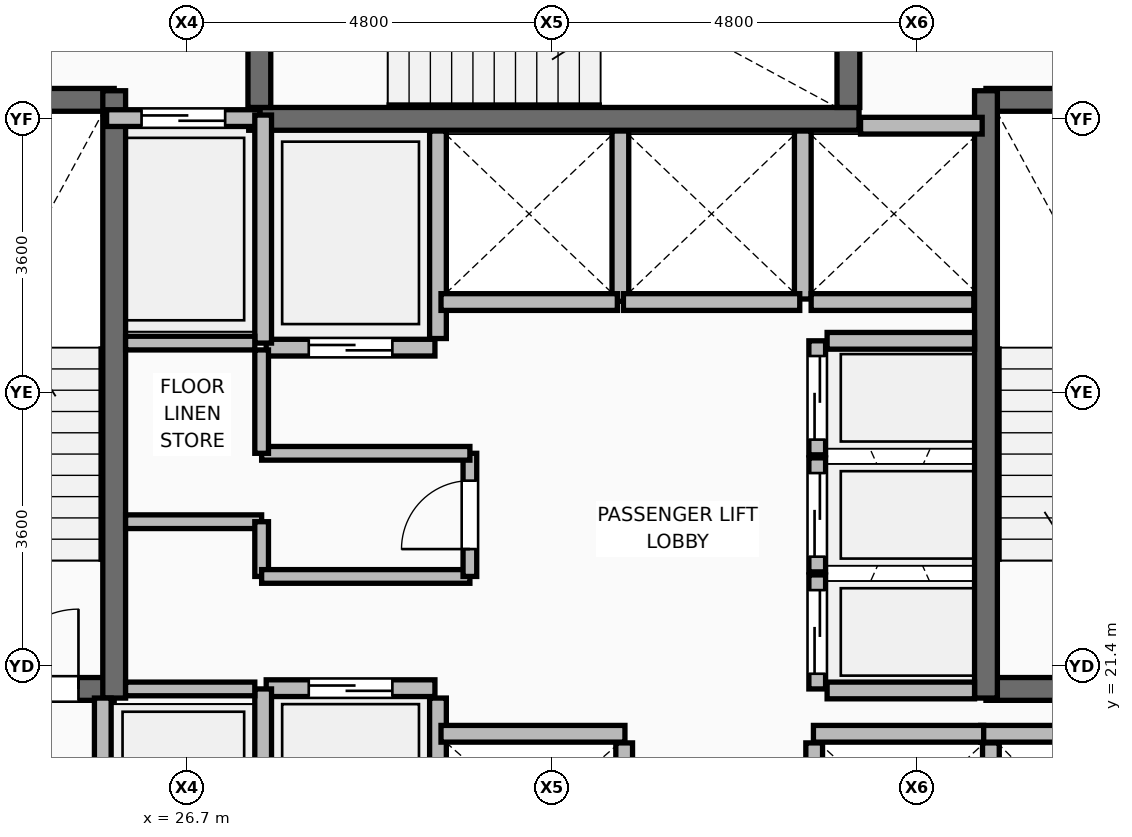
"""IFC4 building model, lengths in metres.
Left out: names, types, materials, properties, quantities, classifications, styles, units other than length and angle.
Written with IfcOpenShell. Run it as: python <this file> out.ifc"""

import sys

from ifc_helpers import new_model, si_unit, direction, frame, frame_2d, origin, place, context, subcontext, project, spatial, rectangle, extrude, element, fill, save


model = new_model("IFC4")
c1 = context("Model", 3, precision=1e-05, world=origin(), true_north=direction((0.0, 1.0)))
c2 = subcontext(c1, "Body", "Model", "MODEL_VIEW")
j1 = project(units=[si_unit("LENGTHUNIT", "METRE"), si_unit("PLANEANGLEUNIT", "RADIAN")], contexts=[c1])
p1 = place(None, origin())
s1 = spatial("IfcSite", under=j1, at=p1, CompositionType="ELEMENT")
p2 = place(p1, origin())
s2 = spatial("IfcBuilding", under=s1, at=p2, CompositionType="ELEMENT")
p3 = place(p2, frame((0.0, 0.0, 149.7)))
s3 = spatial("IfcBuildingStorey", under=s2, at=p3, CompositionType="ELEMENT", Elevation=149.7)
p4 = place(p3, frame((30.0, 18.08, 0.0), z_axis=(0.0, 0.0, 1.0), x_axis=(0.0, 1.0, 0.0)))
e1 = element("IfcWall", 1, at=p4, inside=s3, PredefinedType="PARTITIONING", context=c2, shape_type="SweptSolid", body=[
    extrude(rectangle(XDim=2.9, YDim=0.22, at=frame_2d((1.45, 0.0))), origin(), (0.0, 0.0, 1.0), 3.545),
])
for number, where, z_axis, x_axis in (
    (2, (32.45, 17.92, 0.0), (0.0, 0.0, 1.0), (0.0, 1.0, 0.0)),
    (3, (34.95, 17.92, 0.0), (0.0, 0.0, 1.0), (0.0, 1.0, 0.0)),
):
    element("IfcWall", number, at=place(p3, frame(where, z_axis=z_axis, x_axis=x_axis)), inside=s3, PredefinedType="PARTITIONING", context=c2, shape_type="SweptSolid", body=[
        extrude(rectangle(XDim=2.47, YDim=0.22, at=frame_2d((1.235, 0.0))), origin(), (0.0, 0.0, 1.0), 3.006),
    ])
p5 = place(p3, frame((37.275, 18.08, 0.0), z_axis=(0.0, 0.0, 1.0), x_axis=(0.0, 1.0, 0.0)))
e4 = element("IfcWall", 4, at=p5, inside=s3, PredefinedType="PARTITIONING", context=c2, shape_type="SweptSolid", body=[
    extrude(rectangle(XDim=2.31, YDim=0.22, at=frame_2d((1.155, 0.0))), origin(), (0.0, 0.0, 1.0), 3.545),
])
p6 = place(p3, frame((30.0, 25.71, 0.0), z_axis=(0.0, 0.0, 1.0), x_axis=(0.0, 1.0, 0.0)))
e5 = element("IfcWall", 5, at=p6, inside=s3, PredefinedType="PARTITIONING", context=c2, shape_type="SweptSolid", body=[
    extrude(rectangle(XDim=2.73, YDim=0.22, at=frame_2d((1.365, 0.0))), origin(), (0.0, 0.0, 1.0), 3.545),
])
p7 = place(p3, frame((32.4, 26.2, 0.0), z_axis=(0.0, 0.0, 1.0), x_axis=(0.0, 1.0, 0.0)))
e6 = element("IfcWall", 6, at=p7, inside=s3, PredefinedType="PARTITIONING", context=c2, shape_type="SweptSolid", body=[
    extrude(rectangle(XDim=2.24, YDim=0.22, at=frame_2d((1.12, 0.0))), origin(), (0.0, 0.0, 1.0), 3.545),
])
p8 = place(p3, frame((34.8, 26.23, 0.0), z_axis=(0.0, 0.0, 1.0), x_axis=(0.0, 1.0, 0.0)))
e7 = element("IfcWall", 7, at=p8, inside=s3, PredefinedType="PARTITIONING", context=c2, shape_type="SweptSolid", body=[
    extrude(rectangle(XDim=2.21, YDim=0.22, at=frame_2d((1.105, 0.0))), origin(), (0.0, 0.0, 1.0), 3.545),
])
p9 = place(p3, frame((34.91, 26.19, 0.0), z_axis=(0.0, 0.0, 1.0), x_axis=(1.0, 0.0, 0.0)))
e8 = element("IfcWall", 8, at=p9, inside=s3, PredefinedType="PARTITIONING", context=c2, shape_type="SweptSolid", body=[
    extrude(rectangle(XDim=2.14, YDim=0.22, at=frame_2d((1.07, 0.0))), origin(), (0.0, 0.0, 1.0), 3.545),
])
p10 = place(p3, frame((22.175, 21.1, 0.0), z_axis=(0.0, 0.0, 1.0), x_axis=(1.0, 0.0, 0.0)))
e9 = element("IfcWall", 9, at=p10, inside=s3, PredefinedType="SHEAR", context=c2, shape_type="SweptSolid", body=[
    extrude(rectangle(XDim=3.565, YDim=0.3, at=frame_2d((1.782, 0.0))), origin(), (0.0, 0.0, 1.0), 3.57),
])
p11 = place(p10, frame((2.045, 0.0, 0.0)))
e10 = element("IfcOpeningElement", 10, at=p11, cuts=e9, PredefinedType="OPENING", context=c2, shape_type="SweptSolid", body=[
    extrude(rectangle(XDim=1.05, YDim=2.1, at=frame_2d((0.525, 1.05))), frame((0.0, 0.16, 0.0), z_axis=(0.0, -1.0, 0.0), x_axis=(1.0, 0.0, 0.0)), (0.0, 0.0, 1.0), 0.32),
])
p12 = place(p3, frame((22.175, 28.85, 0.0), z_axis=(0.0, 0.0, 1.0), x_axis=(1.0, 0.0, 0.0)))
e11 = element("IfcWall", 11, at=p12, inside=s3, PredefinedType="SHEAR", context=c2, shape_type="SweptSolid", body=[
    extrude(rectangle(XDim=3.565, YDim=0.3, at=frame_2d((1.782, 0.0))), origin(), (0.0, 0.0, 1.0), 3.57),
])
p13 = place(p3, frame((25.74, 20.98, 0.0), z_axis=(0.0, 0.0, 1.0), x_axis=(0.0, 1.0, 0.0)))
e12 = element("IfcWall", 12, at=p13, inside=s3, PredefinedType="SHEAR", context=c2, shape_type="SweptSolid", body=[
    extrude(rectangle(XDim=7.99, YDim=0.3, at=frame_2d((3.995, 0.0))), origin(), (0.0, 0.0, 1.0), 3.57),
])
for number, where, z_axis, x_axis in (
    (13, (37.21, 21.1, 0.0), (0.0, 0.0, 1.0), (1.0, 0.0, 0.0)),
    (14, (37.21, 28.85, 0.0), (0.0, 0.0, 1.0), (1.0, 0.0, 0.0)),
):
    element("IfcWall", number, at=place(p3, frame(where, z_axis=z_axis, x_axis=x_axis)), inside=s3, PredefinedType="SHEAR", context=c2, shape_type="SweptSolid", body=[
        extrude(rectangle(XDim=3.615, YDim=0.3, at=frame_2d((1.808, 0.0))), origin(), (0.0, 0.0, 1.0), 3.57),
    ])
p14 = place(p3, frame((37.21, 20.98, 0.0), z_axis=(0.0, 0.0, 1.0), x_axis=(0.0, 1.0, 0.0)))
e15 = element("IfcWall", 15, at=p14, inside=s3, PredefinedType="SHEAR", context=c2, shape_type="SweptSolid", body=[
    extrude(rectangle(XDim=7.99, YDim=0.3, at=frame_2d((3.995, 0.0))), origin(), (0.0, 0.0, 1.0), 3.57),
])
p15 = place(p3, frame((27.51, 28.6, 0.0), z_axis=(0.0, 0.0, 1.0), x_axis=(1.0, 0.0, 0.0)))
e16 = element("IfcWall", 16, at=p15, inside=s3, PredefinedType="SHEAR", context=c2, shape_type="SweptSolid", body=[
    extrude(rectangle(XDim=8.03, YDim=0.3, at=frame_2d((4.015, 0.0))), origin(), (0.0, 0.0, 1.0), 3.57),
])
p16 = place(p3, frame((27.65, 28.75, 0.0), z_axis=(0.0, 0.0, 1.0), x_axis=(0.0, 1.0, 0.0)))
e17 = element("IfcWall", 17, at=p16, inside=s3, PredefinedType="SHEAR", context=c2, shape_type="SweptSolid", body=[
    extrude(rectangle(XDim=3.425, YDim=0.3, at=frame_2d((1.712, 0.0))), origin(), (0.0, 0.0, 1.0), 3.57),
])
p17 = place(p16, frame((1.0, 0.0, 0.0)))
e18 = element("IfcOpeningElement", 18, at=p17, cuts=e17, PredefinedType="OPENING", context=c2, shape_type="SweptSolid", body=[
    extrude(rectangle(XDim=1.05, YDim=2.1, at=frame_2d((0.525, 1.05))), frame((0.0, 0.16, 0.0), z_axis=(0.0, -1.0, 0.0), x_axis=(1.0, 0.0, 0.0)), (0.0, 0.0, 1.0), 0.32),
])
p18 = place(p3, frame((35.4, 28.75, 0.0), z_axis=(0.0, 0.0, 1.0), x_axis=(0.0, 1.0, 0.0)))
e19 = element("IfcWall", 19, at=p18, inside=s3, PredefinedType="SHEAR", context=c2, shape_type="SweptSolid", body=[
    extrude(rectangle(XDim=3.425, YDim=0.3, at=frame_2d((1.712, 0.0))), origin(), (0.0, 0.0, 1.0), 3.57),
])
p19 = place(p3, frame((25.59, 18.22, 0.0), z_axis=(0.0, 0.0, 1.0), x_axis=(0.0, 1.0, 0.0)))
e20 = element("IfcWall", 20, at=p19, inside=s3, PredefinedType="PARTITIONING", context=c2, shape_type="SweptSolid", body=[
    extrude(rectangle(XDim=2.76, YDim=0.22, at=frame_2d((1.38, 0.0))), origin(), (0.0, 0.0, 1.0), 3.55),
])
p20 = place(p19, frame((0.83, 0.0, 0.0)))
e21 = element("IfcOpeningElement", 21, at=p20, cuts=e20, PredefinedType="OPENING", context=c2, shape_type="SweptSolid", body=[
    extrude(rectangle(XDim=1.1, YDim=2.2, at=frame_2d((0.55, 1.1))), frame((0.0, 0.12, 0.0), z_axis=(0.0, -1.0, 0.0), x_axis=(1.0, 0.0, 0.0)), (0.0, 0.0, 1.0), 0.24),
])
p21 = place(p3, frame((25.64, 28.61, 0.0), z_axis=(0.0, 0.0, 1.0), x_axis=(1.0, 0.0, 0.0)))
e22 = element("IfcWall", 22, at=p21, inside=s3, PredefinedType="PARTITIONING", context=c2, shape_type="SweptSolid", body=[
    extrude(rectangle(XDim=2.02, YDim=0.22, at=frame_2d((1.01, 0.0))), origin(), (0.0, 0.0, 1.0), 3.55),
])
p22 = place(p21, frame((0.46, 0.0, 0.0)))
e23 = element("IfcOpeningElement", 23, at=p22, cuts=e22, PredefinedType="OPENING", context=c2, shape_type="SweptSolid", body=[
    extrude(rectangle(XDim=1.1, YDim=2.2, at=frame_2d((0.55, 1.1))), frame((0.0, 0.12, 0.0), z_axis=(0.0, -1.0, 0.0), x_axis=(1.0, 0.0, 0.0)), (0.0, 0.0, 1.0), 0.24),
])
p23 = place(p3, frame((27.74, 21.11, 0.0), z_axis=(0.0, 0.0, 1.0), x_axis=(1.0, 0.0, 0.0)))
e24 = element("IfcWall", 24, at=p23, inside=s3, PredefinedType="PARTITIONING", context=c2, shape_type="SweptSolid", body=[
    extrude(rectangle(XDim=2.22, YDim=0.22, at=frame_2d((1.11, 0.0))), origin(), (0.0, 0.0, 1.0), 3.55),
])
p24 = place(p23, frame((0.56, 0.0, 0.0)))
e25 = element("IfcOpeningElement", 25, at=p24, cuts=e24, PredefinedType="OPENING", context=c2, shape_type="SweptSolid", body=[
    extrude(rectangle(XDim=1.1, YDim=2.2, at=frame_2d((0.55, 1.1))), frame((0.0, 0.12, 0.0), z_axis=(0.0, -1.0, 0.0), x_axis=(1.0, 0.0, 0.0)), (0.0, 0.0, 1.0), 0.24),
])
p25 = place(p3, frame((27.74, 25.59, 0.0), z_axis=(0.0, 0.0, 1.0), x_axis=(1.0, 0.0, 0.0)))
e26 = element("IfcWall", 26, at=p25, inside=s3, PredefinedType="PARTITIONING", context=c2, shape_type="SweptSolid", body=[
    extrude(rectangle(XDim=2.22, YDim=0.22, at=frame_2d((1.11, 0.0))), origin(), (0.0, 0.0, 1.0), 3.55),
])
p26 = place(p25, frame((0.56, 0.0, 0.0)))
e27 = element("IfcOpeningElement", 27, at=p26, cuts=e26, PredefinedType="OPENING", context=c2, shape_type="SweptSolid", body=[
    extrude(rectangle(XDim=1.1, YDim=2.2, at=frame_2d((0.55, 1.1))), frame((0.0, 0.12, 0.0), z_axis=(0.0, -1.0, 0.0), x_axis=(1.0, 0.0, 0.0)), (0.0, 0.0, 1.0), 0.24),
])
p27 = place(p3, frame((30.04, 20.51, 0.0), z_axis=(0.0, 0.0, 1.0), x_axis=(1.0, 0.0, 0.0)))
e28 = element("IfcWall", 28, at=p27, inside=s3, PredefinedType="PARTITIONING", context=c2, shape_type="SweptSolid", body=[
    extrude(rectangle(XDim=2.42, YDim=0.22, at=frame_2d((1.21, 0.0))), origin(), (0.0, 0.0, 1.0), 3.55),
])
for number, where, z_axis, x_axis in (
    (29, (37.14, 20.51, 0.0), (0.0, 0.0, 1.0), (1.0, 0.0, 0.0)),
    (30, (34.94, 20.51, 0.0), (0.0, 0.0, 1.0), (1.0, 0.0, 0.0)),
):
    element("IfcWall", number, at=place(p3, frame(where, z_axis=z_axis, x_axis=x_axis)), inside=s3, PredefinedType="PARTITIONING", context=c2, shape_type="SweptSolid", body=[
        extrude(rectangle(XDim=2.24, YDim=0.22, at=frame_2d((1.12, 0.0))), origin(), (0.0, 0.0, 1.0), 3.55),
    ])
for number, where, z_axis, x_axis in (
    (31, (30.04, 26.19, 0.0), (0.0, 0.0, 1.0), (1.0, 0.0, 0.0)),
    (32, (32.44, 26.19, 0.0), (0.0, 0.0, 1.0), (1.0, 0.0, 0.0)),
):
    element("IfcWall", number, at=place(p3, frame(where, z_axis=z_axis, x_axis=x_axis)), inside=s3, PredefinedType="PARTITIONING", context=c2, shape_type="SweptSolid", body=[
        extrude(rectangle(XDim=2.32, YDim=0.22, at=frame_2d((1.16, 0.0))), origin(), (0.0, 0.0, 1.0), 3.55),
    ])
p28 = place(p3, frame((35.56, 28.51, 0.0), z_axis=(0.0, 0.0, 1.0), x_axis=(1.0, 0.0, 0.0)))
e33 = element("IfcWall", 33, at=p28, inside=s3, PredefinedType="PARTITIONING", context=c2, shape_type="SweptSolid", body=[
    extrude(rectangle(XDim=1.6, YDim=0.22, at=frame_2d((0.8, 0.0))), origin(), (0.0, 0.0, 1.0), 3.55),
])
p29 = place(p3, frame((34.99, 21.1, 0.0), z_axis=(0.0, 0.0, 1.0), x_axis=(0.0, 1.0, 0.0)))
e34 = element("IfcWall", 34, at=p29, inside=s3, PredefinedType="PARTITIONING", context=c2, shape_type="SweptSolid", body=[
    extrude(rectangle(XDim=1.5, YDim=0.22, at=frame_2d((0.75, 0.0))), origin(), (0.0, 0.0, 1.0), 3.55),
])
p30 = place(p29, frame((0.2, 0.0, 0.0)))
e35 = element("IfcOpeningElement", 35, at=p30, cuts=e34, PredefinedType="OPENING", context=c2, shape_type="SweptSolid", body=[
    extrude(rectangle(XDim=1.1, YDim=2.2, at=frame_2d((0.55, 1.1))), frame((0.0, 0.12, 0.0), z_axis=(0.0, -1.0, 0.0), x_axis=(1.0, 0.0, 0.0)), (0.0, 0.0, 1.0), 0.24),
])
p31 = place(p3, frame((34.99, 22.64, 0.0), z_axis=(0.0, 0.0, 1.0), x_axis=(0.0, 1.0, 0.0)))
e36 = element("IfcWall", 36, at=p31, inside=s3, PredefinedType="PARTITIONING", context=c2, shape_type="SweptSolid", body=[
    extrude(rectangle(XDim=1.5, YDim=0.22, at=frame_2d((0.75, 0.0))), origin(), (0.0, 0.0, 1.0), 3.55),
])
p32 = place(p31, frame((0.2, 0.0, 0.0)))
e37 = element("IfcOpeningElement", 37, at=p32, cuts=e36, PredefinedType="OPENING", context=c2, shape_type="SweptSolid", body=[
    extrude(rectangle(XDim=1.1, YDim=2.2, at=frame_2d((0.55, 1.1))), frame((0.0, 0.12, 0.0), z_axis=(0.0, -1.0, 0.0), x_axis=(1.0, 0.0, 0.0)), (0.0, 0.0, 1.0), 0.24),
])
p33 = place(p3, frame((34.99, 24.18, 0.0), z_axis=(0.0, 0.0, 1.0), x_axis=(0.0, 1.0, 0.0)))
e38 = element("IfcWall", 38, at=p33, inside=s3, PredefinedType="PARTITIONING", context=c2, shape_type="SweptSolid", body=[
    extrude(rectangle(XDim=1.5, YDim=0.22, at=frame_2d((0.75, 0.0))), origin(), (0.0, 0.0, 1.0), 3.55),
])
p34 = place(p33, frame((0.2, 0.0, 0.0)))
e39 = element("IfcOpeningElement", 39, at=p34, cuts=e38, PredefinedType="OPENING", context=c2, shape_type="SweptSolid", body=[
    extrude(rectangle(XDim=1.1, YDim=2.2, at=frame_2d((0.55, 1.1))), frame((0.0, 0.12, 0.0), z_axis=(0.0, -1.0, 0.0), x_axis=(1.0, 0.0, 0.0)), (0.0, 0.0, 1.0), 0.24),
])
p35 = place(p3, frame((27.7, 18.15, 0.0), z_axis=(0.0, 0.0, 1.0), x_axis=(0.0, 1.0, 0.0)))
e40 = element("IfcWall", 40, at=p35, inside=s3, PredefinedType="PARTITIONING", context=c2, shape_type="SweptSolid", body=[
    extrude(rectangle(XDim=2.95, YDim=0.22, at=frame_2d((1.475, 0.0))), origin(), (0.0, 0.0, 1.0), 3.55),
])
p36 = place(p3, frame((27.7, 25.65, 0.0), z_axis=(0.0, 0.0, 1.0), x_axis=(0.0, 1.0, 0.0)))
e41 = element("IfcWall", 41, at=p36, inside=s3, PredefinedType="PARTITIONING", context=c2, shape_type="SweptSolid", body=[
    extrude(rectangle(XDim=3.0, YDim=0.22, at=frame_2d((1.5, 0.0))), origin(), (0.0, 0.0, 1.0), 3.55),
])
for number, where, z_axis, x_axis in (
    (42, (35.12, 21.08, 0.0), (0.0, 0.0, 1.0), (1.0, 0.0, 0.0)),
    (43, (35.12, 25.68, 0.0), (0.0, 0.0, 1.0), (1.0, 0.0, 0.0)),
):
    element("IfcWall", number, at=place(p3, frame(where, z_axis=z_axis, x_axis=x_axis)), inside=s3, PredefinedType="PARTITIONING", context=c2, shape_type="SweptSolid", body=[
        extrude(rectangle(XDim=1.94, YDim=0.22, at=frame_2d((0.97, 0.0))), origin(), (0.0, 0.0, 1.0), 3.55),
    ])
for number, where, z_axis, x_axis in (
    (44, (25.89, 21.1, 0.0), (0.0, 0.0, 1.0), (1.0, 0.0, 0.0)),
    (45, (25.89, 25.65, 0.0), (0.0, 0.0, 1.0), (1.0, 0.0, 0.0)),
):
    element("IfcWall", number, at=place(p3, frame(where, z_axis=z_axis, x_axis=x_axis)), inside=s3, PredefinedType="PARTITIONING", context=c2, shape_type="SweptSolid", body=[
        extrude(rectangle(XDim=1.7, YDim=0.18, at=frame_2d((0.85, 0.0))), origin(), (0.0, 0.0, 1.0), 3.55),
    ])
p37 = place(p3, frame((25.89, 23.3, 0.0), z_axis=(0.0, 0.0, 1.0), x_axis=(1.0, 0.0, 0.0)))
e46 = element("IfcWall", 46, at=p37, inside=s3, PredefinedType="PARTITIONING", context=c2, shape_type="SweptSolid", body=[
    extrude(rectangle(XDim=1.79, YDim=0.18, at=frame_2d((0.895, 0.0))), origin(), (0.0, 0.0, 1.0), 3.55),
])
p38 = place(p3, frame((27.68, 22.58, 0.0), z_axis=(0.0, 0.0, 1.0), x_axis=(0.0, 1.0, 0.0)))
e47 = element("IfcWall", 47, at=p38, inside=s3, PredefinedType="PARTITIONING", context=c2, shape_type="SweptSolid", body=[
    extrude(rectangle(XDim=0.72, YDim=0.18, at=frame_2d((0.36, 0.0))), origin(), (0.0, 0.0, 1.0), 3.55),
])
p39 = place(p3, frame((27.68, 22.58, 0.0), z_axis=(0.0, 0.0, 1.0), x_axis=(1.0, 0.0, 0.0)))
e48 = element("IfcWall", 48, at=p39, inside=s3, PredefinedType="PARTITIONING", context=c2, shape_type="SweptSolid", body=[
    extrude(rectangle(XDim=2.74, YDim=0.18, at=frame_2d((1.37, 0.0))), origin(), (0.0, 0.0, 1.0), 3.55),
])
p40 = place(p3, frame((30.42, 22.58, 0.0), z_axis=(0.0, 0.0, 1.0), x_axis=(0.0, 1.0, 0.0)))
e49 = element("IfcWall", 49, at=p40, inside=s3, PredefinedType="PARTITIONING", context=c2, shape_type="SweptSolid", body=[
    extrude(rectangle(XDim=1.62, YDim=0.18, at=frame_2d((0.81, 0.0))), origin(), (0.0, 0.0, 1.0), 3.55),
])
p41 = place(p40, frame((0.36, 0.0, 0.0)))
e50 = element("IfcOpeningElement", 50, at=p41, cuts=e49, PredefinedType="OPENING", context=c2, shape_type="SweptSolid", body=[
    extrude(rectangle(XDim=0.9, YDim=2.1, at=frame_2d((0.45, 1.05))), frame((0.0, 0.1, 0.0), z_axis=(0.0, -1.0, 0.0), x_axis=(1.0, 0.0, 0.0)), (0.0, 0.0, 1.0), 0.2),
])
p42 = place(p3, frame((27.68, 24.2, 0.0), z_axis=(0.0, 0.0, 1.0), x_axis=(1.0, 0.0, 0.0)))
e51 = element("IfcWall", 51, at=p42, inside=s3, PredefinedType="PARTITIONING", context=c2, shape_type="SweptSolid", body=[
    extrude(rectangle(XDim=2.74, YDim=0.18, at=frame_2d((1.37, 0.0))), origin(), (0.0, 0.0, 1.0), 3.55),
])
p43 = place(p3, frame((27.68, 24.2, 0.0), z_axis=(0.0, 0.0, 1.0), x_axis=(0.0, 1.0, 0.0)))
e52 = element("IfcWall", 52, at=p43, inside=s3, PredefinedType="PARTITIONING", context=c2, shape_type="SweptSolid", body=[
    extrude(rectangle(XDim=1.36, YDim=0.18, at=frame_2d((0.68, 0.0))), origin(), (0.0, 0.0, 1.0), 3.55),
])
p44 = place(p11, origin())
e53 = element("IfcDoor", 53, at=p44, inside=s3, OperationType="SINGLE_SWING_RIGHT", PredefinedType="DOOR", context=c2, shape_type="SweptSolid", body=[
    extrude(rectangle(XDim=1.05, YDim=2.1, at=frame_2d((0.525, 1.05))), frame((0.0, 0.025, 0.0), z_axis=(0.0, -1.0, 0.0), x_axis=(1.0, 0.0, 0.0)), (0.0, 0.0, 1.0), 0.05),
])
fill(e10, e53)
p45 = place(p22, origin())
e54 = element("IfcDoor", 54, at=p45, inside=s3, OperationType="DOUBLE_DOOR_SLIDING", PredefinedType="DOOR", context=c2, shape_type="SweptSolid", body=[
    extrude(rectangle(XDim=1.1, YDim=2.2, at=frame_2d((0.55, 1.1))), frame((0.0, 0.025, 0.0), z_axis=(0.0, -1.0, 0.0), x_axis=(1.0, 0.0, 0.0)), (0.0, 0.0, 1.0), 0.05),
])
fill(e23, e54)
p46 = place(p24, origin())
e55 = element("IfcDoor", 55, at=p46, inside=s3, OperationType="DOUBLE_DOOR_SLIDING", PredefinedType="DOOR", context=c2, shape_type="SweptSolid", body=[
    extrude(rectangle(XDim=1.1, YDim=2.2, at=frame_2d((0.55, 1.1))), frame((0.0, 0.025, 0.0), z_axis=(0.0, -1.0, 0.0), x_axis=(1.0, 0.0, 0.0)), (0.0, 0.0, 1.0), 0.05),
])
fill(e25, e55)
p47 = place(p26, frame((1.1, 0.0, 0.0), z_axis=(0.0, 0.0, 1.0), x_axis=(-1.0, 0.0, 0.0)))
e56 = element("IfcDoor", 56, at=p47, inside=s3, OperationType="DOUBLE_DOOR_SLIDING", PredefinedType="DOOR", context=c2, shape_type="SweptSolid", body=[
    extrude(rectangle(XDim=1.1, YDim=2.2, at=frame_2d((0.55, 1.1))), frame((0.0, 0.025, 0.0), z_axis=(0.0, -1.0, 0.0), x_axis=(1.0, 0.0, 0.0)), (0.0, 0.0, 1.0), 0.05),
])
fill(e27, e56)
p48 = place(p30, origin())
e57 = element("IfcDoor", 57, at=p48, inside=s3, OperationType="DOUBLE_DOOR_SLIDING", PredefinedType="DOOR", context=c2, shape_type="SweptSolid", body=[
    extrude(rectangle(XDim=1.1, YDim=2.2, at=frame_2d((0.55, 1.1))), frame((0.0, 0.025, 0.0), z_axis=(0.0, -1.0, 0.0), x_axis=(1.0, 0.0, 0.0)), (0.0, 0.0, 1.0), 0.05),
])
fill(e35, e57)
p49 = place(p32, origin())
e58 = element("IfcDoor", 58, at=p49, inside=s3, OperationType="DOUBLE_DOOR_SLIDING", PredefinedType="DOOR", context=c2, shape_type="SweptSolid", body=[
    extrude(rectangle(XDim=1.1, YDim=2.2, at=frame_2d((0.55, 1.1))), frame((0.0, 0.025, 0.0), z_axis=(0.0, -1.0, 0.0), x_axis=(1.0, 0.0, 0.0)), (0.0, 0.0, 1.0), 0.05),
])
fill(e37, e58)
p50 = place(p34, origin())
e59 = element("IfcDoor", 59, at=p50, inside=s3, OperationType="DOUBLE_DOOR_SLIDING", PredefinedType="DOOR", context=c2, shape_type="SweptSolid", body=[
    extrude(rectangle(XDim=1.1, YDim=2.2, at=frame_2d((0.55, 1.1))), frame((0.0, 0.025, 0.0), z_axis=(0.0, -1.0, 0.0), x_axis=(1.0, 0.0, 0.0)), (0.0, 0.0, 1.0), 0.05),
])
fill(e39, e59)
p51 = place(p41, origin())
e60 = element("IfcDoor", 60, at=p51, inside=s3, OperationType="SINGLE_SWING_LEFT", PredefinedType="DOOR", context=c2, shape_type="SweptSolid", body=[
    extrude(rectangle(XDim=0.9, YDim=2.1, at=frame_2d((0.45, 1.05))), frame((0.0, 0.025, 0.0), z_axis=(0.0, -1.0, 0.0), x_axis=(1.0, 0.0, 0.0)), (0.0, 0.0, 1.0), 0.05),
])
fill(e50, e60)
save(model, sys.argv[1])
